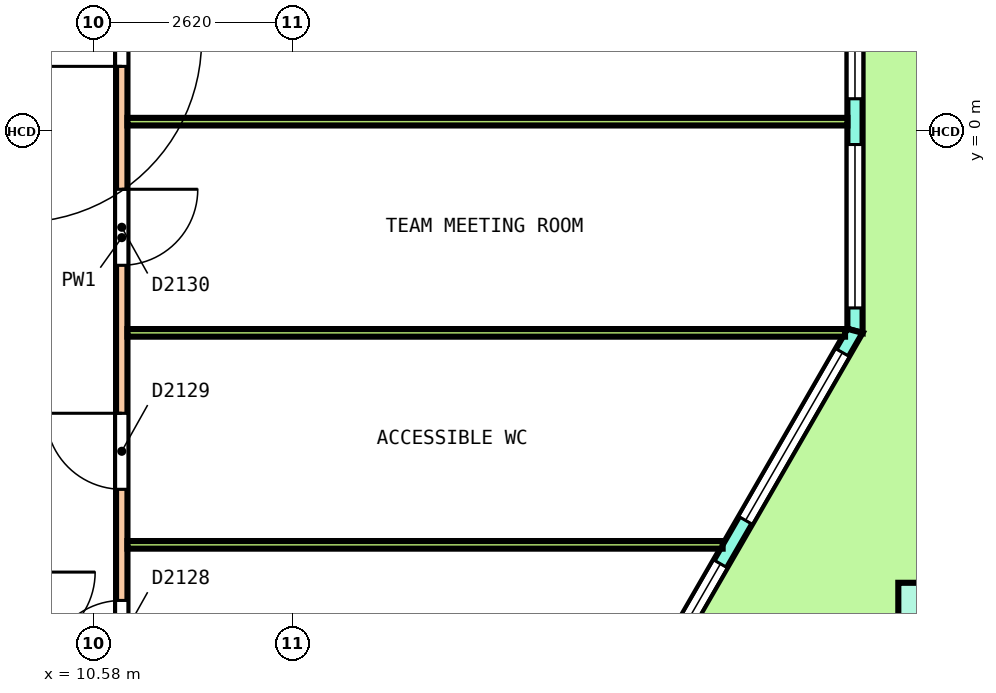
"""IFC4 building model, lengths in metres.
Left out: names, types, materials, properties, quantities, classifications, styles, units other than length and angle.
Written with IfcOpenShell. Run it as: python <this file> out.ifc"""

import sys

from ifc_helpers import new_model, si_unit, direction, frame, frame_2d, origin, origin_2d, place, context, subcontext, project, spatial, polyline, rectangle, outline, extrude, element, fill, save


model = new_model("IFC4")
c1 = context("Model", 3, precision=1e-05, world=origin(), true_north=direction((0.0, 1.0)))
c2 = subcontext(c1, "Body", "Model", "MODEL_VIEW")
j1 = project(units=[si_unit("LENGTHUNIT", "METRE"), si_unit("PLANEANGLEUNIT", "RADIAN")], contexts=[c1])
p1 = place(None, origin())
s1 = spatial("IfcSite", under=j1, at=p1, CompositionType="ELEMENT")
p2 = place(p1, origin())
s2 = spatial("IfcBuilding", under=s1, at=p2, CompositionType="ELEMENT")
p3 = place(p2, frame((0.0, 0.0, 267.0)))
s3 = spatial("IfcBuildingStorey", under=s2, at=p3, CompositionType="ELEMENT", Elevation=267.0)
p4 = place(p3, frame((21.642, -6.416, 0.0), z_axis=(0.010900423214, 0.018858400897, 0.999762742599), x_axis=(0.500226175498, 0.86562076849, -0.02178206845)))
e1 = element("IfcColumn", 1, at=p4, inside=s3, PredefinedType="COLUMN", context=c2, shape_type="SweptSolid", body=[
    extrude(rectangle(XDim=0.95, YDim=0.95, at=origin_2d()), origin(), (0.0, 0.0, 1.0), 3.651),
])
p5 = place(p3, frame((20.596, -2.626, 0.0), z_axis=(0.0, 0.0, 1.0), x_axis=(0.0, 1.0, 0.0)))
e2 = element("IfcWall", 2, at=p5, inside=s3, PredefinedType="SOLIDWALL", context=c2, shape_type="SweptSolid", body=[
    extrude(outline(polyline([(-0.027, -0.1), (1.084, -0.1), (2.196, -0.1), (3.307, -0.1), (4.419, -0.1), (5.53, -0.1), (5.477, 0.1), (4.387, 0.1), (3.297, 0.1), (2.207, 0.1), (1.117, 0.1), (0.027, 0.1), (-0.027, -0.1)])), origin(), (0.0, 0.0, 1.0), 3.7),
])
p6 = place(p5, frame((0.301, 0.0, 0.1)))
e3 = element("IfcOpeningElement", 3, at=p6, cuts=e2, PredefinedType="OPENING", context=c2, shape_type="SweptSolid", body=[
    extrude(rectangle(XDim=2.15, YDim=2.75, at=frame_2d((1.075, 1.375))), frame((0.0, 0.11, 0.0), z_axis=(0.0, -1.0, 0.0), x_axis=(1.0, 0.0, 0.0)), (0.0, 0.0, 1.0), 0.22),
])
p7 = place(p5, frame((3.052, 0.0, 0.1)))
e4 = element("IfcOpeningElement", 4, at=p7, cuts=e2, PredefinedType="OPENING", context=c2, shape_type="SweptSolid", body=[
    extrude(rectangle(XDim=2.15, YDim=2.75, at=frame_2d((1.075, 1.375))), frame((0.0, 0.11, 0.0), z_axis=(0.0, -1.0, 0.0), x_axis=(1.0, 0.0, 0.0)), (0.0, 0.0, 1.0), 0.22),
])
p8 = place(p3, frame((12.573, -16.524, 0.0), z_axis=(0.0, 0.0, 1.0), x_axis=(0.499997245374, 0.866026994163, 0.0)))
e5 = element("IfcWall", 5, at=p8, inside=s3, PredefinedType="SOLIDWALL", context=c2, shape_type="SweptSolid", body=[
    extrude(outline(polyline([(-0.027, -0.1), (0.979, -0.1), (1.986, -0.1), (2.992, -0.1), (3.999, -0.1), (5.005, -0.1), (6.011, -0.1), (7.018, -0.1), (8.024, -0.1), (9.03, -0.1), (10.037, -0.1), (11.043, -0.1), (12.049, -0.1), (13.056, -0.1), (14.062, -0.1), (15.068, -0.1), (16.075, -0.1), (16.021, 0.1), (15.021, 0.1), (14.022, 0.1), (13.022, 0.1), (12.022, 0.1), (11.023, 0.1), (10.023, 0.1), (9.023, 0.1), (8.024, 0.1), (7.024, 0.1), (6.025, 0.1), (5.025, 0.1), (4.025, 0.1), (3.026, 0.1), (2.026, 0.1), (1.026, 0.1), (0.027, 0.1), (-0.027, -0.1)])), origin(), (0.0, 0.0, 1.0), 3.7),
])
p9 = place(p8, frame((0.33, 0.0, 0.1)))
e6 = element("IfcOpeningElement", 6, at=p9, cuts=e5, PredefinedType="OPENING", context=c2, shape_type="SweptSolid", body=[
    extrude(rectangle(XDim=2.55, YDim=2.75, at=frame_2d((1.275, 1.375))), frame((0.0, 0.11, 0.0), z_axis=(0.0, -1.0, 0.0), x_axis=(1.0, 0.0, 0.0)), (0.0, 0.0, 1.0), 0.22),
])
p10 = place(p8, frame((3.539, 0.0, 0.1)))
e7 = element("IfcOpeningElement", 7, at=p10, cuts=e5, PredefinedType="OPENING", context=c2, shape_type="SweptSolid", body=[
    extrude(rectangle(XDim=2.55, YDim=2.75, at=frame_2d((1.275, 1.375))), frame((0.0, 0.11, 0.0), z_axis=(0.0, -1.0, 0.0), x_axis=(1.0, 0.0, 0.0)), (0.0, 0.0, 1.0), 0.22),
])
p11 = place(p8, frame((7.124, 0.0, 0.0)))
e8 = element("IfcOpeningElement", 8, at=p11, cuts=e5, PredefinedType="OPENING", context=c2, shape_type="SweptSolid", body=[
    extrude(rectangle(XDim=1.8, YDim=2.4, at=frame_2d((0.9, 1.2))), frame((0.0, 0.11, 0.0), z_axis=(0.0, -1.0, 0.0), x_axis=(1.0, 0.0, 0.0)), (0.0, 0.0, 1.0), 0.22),
])
p12 = place(p8, frame((7.124, 0.0, 2.55)))
e9 = element("IfcOpeningElement", 9, at=p12, cuts=e5, PredefinedType="OPENING", context=c2, shape_type="SweptSolid", body=[
    extrude(rectangle(XDim=1.8, YDim=0.3, at=frame_2d((0.9, 0.15))), frame((0.0, 0.11, 0.0), z_axis=(0.0, -1.0, 0.0), x_axis=(1.0, 0.0, 0.0)), (0.0, 0.0, 1.0), 0.22),
])
p13 = place(p8, frame((9.958, 0.0, 0.1)))
e10 = element("IfcOpeningElement", 10, at=p13, cuts=e5, PredefinedType="OPENING", context=c2, shape_type="SweptSolid", body=[
    extrude(rectangle(XDim=2.55, YDim=2.75, at=frame_2d((1.275, 1.375))), frame((0.0, 0.11, 0.0), z_axis=(0.0, -1.0, 0.0), x_axis=(1.0, 0.0, 0.0)), (0.0, 0.0, 1.0), 0.22),
])
p14 = place(p8, frame((13.168, 0.0, 0.1)))
e11 = element("IfcOpeningElement", 11, at=p14, cuts=e5, PredefinedType="OPENING", context=c2, shape_type="SweptSolid", body=[
    extrude(rectangle(XDim=2.55, YDim=2.75, at=frame_2d((1.275, 1.375))), frame((0.0, 0.11, 0.0), z_axis=(0.0, -1.0, 0.0), x_axis=(1.0, 0.0, 0.0)), (0.0, 0.0, 1.0), 0.22),
])
p15 = place(p3, frame((10.95, -9.975, 0.0), z_axis=(0.0, 0.0, 1.0), x_axis=(0.0, 1.0, 0.0)))
e12 = element("IfcWall", 12, at=p15, inside=s3, PredefinedType="PARTITIONING", context=c2, shape_type="SweptSolid", body=[
    extrude(rectangle(XDim=17.15, YDim=0.15, at=frame_2d((8.575, 0.0))), origin(), (0.0, 0.0, 1.0), 2.9),
])
p16 = place(p15, frame((10.828, 0.0, 0.0)))
e13 = element("IfcOpeningElement", 13, at=p16, cuts=e12, PredefinedType="OPENING", context=c2, shape_type="SweptSolid", body=[
    extrude(rectangle(XDim=1.0, YDim=2.1, at=frame_2d((0.5, 1.05))), frame((0.0, 0.085, 0.0), z_axis=(0.0, -1.0, 0.0), x_axis=(1.0, 0.0, 0.0)), (0.0, 0.0, 1.0), 0.17),
])
p17 = place(p15, frame((13.989, 0.0, 0.0)))
e14 = element("IfcOpeningElement", 14, at=p17, cuts=e12, PredefinedType="OPENING", context=c2, shape_type="SweptSolid", body=[
    extrude(rectangle(XDim=1.0, YDim=2.1, at=frame_2d((0.5, 1.05))), frame((0.0, 0.085, 0.0), z_axis=(0.0, -1.0, 0.0), x_axis=(1.0, 0.0, 0.0)), (0.0, 0.0, 1.0), 0.17),
])
p18 = place(p15, frame((2.802, 0.0, 0.0)))
e15 = element("IfcOpeningElement", 15, at=p18, cuts=e12, PredefinedType="OPENING", context=c2, shape_type="SweptSolid", body=[
    extrude(rectangle(XDim=1.0, YDim=2.1, at=frame_2d((0.5, 1.05))), frame((0.0, 0.085, 0.0), z_axis=(0.0, -1.0, 0.0), x_axis=(1.0, 0.0, 0.0)), (0.0, 0.0, 1.0), 0.17),
])
p19 = place(p15, frame((5.264, 0.0, 0.0)))
e16 = element("IfcOpeningElement", 16, at=p19, cuts=e12, PredefinedType="OPENING", context=c2, shape_type="SweptSolid", body=[
    extrude(rectangle(XDim=1.0, YDim=2.1, at=frame_2d((0.5, 1.05))), frame((0.0, 0.085, 0.0), z_axis=(0.0, -1.0, 0.0), x_axis=(1.0, 0.0, 0.0)), (0.0, 0.0, 1.0), 0.17),
])
p20 = place(p15, frame((8.211, 0.0, 0.0)))
e17 = element("IfcOpeningElement", 17, at=p20, cuts=e12, PredefinedType="OPENING", context=c2, shape_type="SweptSolid", body=[
    extrude(rectangle(XDim=1.0, YDim=2.1, at=frame_2d((0.5, 1.05))), frame((0.0, 0.085, 0.0), z_axis=(0.0, -1.0, 0.0), x_axis=(1.0, 0.0, 0.0)), (0.0, 0.0, 1.0), 0.17),
])
p21 = place(p3, frame((11.025, 0.126, 0.0), z_axis=(0.0, 0.0, 1.0), x_axis=(1.0, 0.0, 0.0)))
e18 = element("IfcWall", 18, at=p21, inside=s3, PredefinedType="PARTITIONING", context=c2, shape_type="SweptSolid", body=[
    extrude(rectangle(XDim=9.471, YDim=0.1, at=frame_2d((4.736, 0.0))), origin(), (0.0, 0.0, 1.0), 2.9),
])
p22 = place(p3, frame((11.025, -2.653, 0.0), z_axis=(0.0, 0.0, 1.0), x_axis=(1.0, 0.0, 0.0)))
e19 = element("IfcWall", 19, at=p22, inside=s3, PredefinedType="PARTITIONING", context=c2, shape_type="SweptSolid", body=[
    extrude(rectangle(XDim=9.441, YDim=0.1, at=frame_2d((4.72, 0.0))), origin(), (0.0, 0.0, 1.0), 2.9),
])
p23 = place(p3, frame((11.025, -5.442, 0.0), z_axis=(0.0, 0.0, 1.0), x_axis=(1.0, 0.0, 0.0)))
e20 = element("IfcWall", 20, at=p23, inside=s3, PredefinedType="PARTITIONING", context=c2, shape_type="SweptSolid", body=[
    extrude(rectangle(XDim=7.83, YDim=0.1, at=frame_2d((3.915, 0.0))), origin(), (0.0, 0.0, 1.0), 2.9),
])
p24 = place(p6, origin())
e21 = element("IfcWindow", 21, at=p24, inside=s3, PartitioningType="SINGLE_PANEL", PredefinedType="WINDOW", context=c2, shape_type="SweptSolid", body=[
    extrude(rectangle(XDim=2.15, YDim=2.75, at=frame_2d((1.075, 1.375))), frame((0.0, 0.03, 0.0), z_axis=(0.0, -1.0, 0.0), x_axis=(1.0, 0.0, 0.0)), (0.0, 0.0, 1.0), 0.06),
])
fill(e3, e21)
p25 = place(p7, origin())
e22 = element("IfcWindow", 22, at=p25, inside=s3, PartitioningType="SINGLE_PANEL", PredefinedType="WINDOW", context=c2, shape_type="SweptSolid", body=[
    extrude(rectangle(XDim=2.15, YDim=2.75, at=frame_2d((1.075, 1.375))), frame((0.0, 0.03, 0.0), z_axis=(0.0, -1.0, 0.0), x_axis=(1.0, 0.0, 0.0)), (0.0, 0.0, 1.0), 0.06),
])
fill(e4, e22)
p26 = place(p13, origin())
e23 = element("IfcWindow", 23, at=p26, inside=s3, PartitioningType="SINGLE_PANEL", PredefinedType="WINDOW", context=c2, shape_type="SweptSolid", body=[
    extrude(rectangle(XDim=2.55, YDim=2.75, at=frame_2d((1.275, 1.375))), frame((0.0, 0.03, 0.0), z_axis=(0.0, -1.0, 0.0), x_axis=(1.0, 0.0, 0.0)), (0.0, 0.0, 1.0), 0.06),
])
fill(e10, e23)
p27 = place(p14, origin())
e24 = element("IfcWindow", 24, at=p27, inside=s3, PartitioningType="SINGLE_PANEL", PredefinedType="WINDOW", context=c2, shape_type="SweptSolid", body=[
    extrude(rectangle(XDim=2.55, YDim=2.75, at=frame_2d((1.275, 1.375))), frame((0.0, 0.03, 0.0), z_axis=(0.0, -1.0, 0.0), x_axis=(1.0, 0.0, 0.0)), (0.0, 0.0, 1.0), 0.06),
])
fill(e11, e24)
p28 = place(p16, origin())
e25 = element("IfcDoor", 25, at=p28, inside=s3, OperationType="SINGLE_SWING_LEFT", PredefinedType="DOOR", context=c2, shape_type="SweptSolid", body=[
    extrude(rectangle(XDim=1.0, YDim=2.1, at=frame_2d((0.5, 1.05))), frame((0.0, 0.025, 0.0), z_axis=(0.0, -1.0, 0.0), x_axis=(1.0, 0.0, 0.0)), (0.0, 0.0, 1.0), 0.05),
])
fill(e13, e25)
p29 = place(p18, origin())
e26 = element("IfcDoor", 26, at=p29, inside=s3, OperationType="SINGLE_SWING_LEFT", PredefinedType="DOOR", context=c2, shape_type="SweptSolid", body=[
    extrude(rectangle(XDim=1.0, YDim=2.1, at=frame_2d((0.5, 1.05))), frame((0.0, 0.025, 0.0), z_axis=(0.0, -1.0, 0.0), x_axis=(1.0, 0.0, 0.0)), (0.0, 0.0, 1.0), 0.05),
])
fill(e15, e26)
p30 = place(p19, origin())
e27 = element("IfcDoor", 27, at=p30, inside=s3, OperationType="SINGLE_SWING_RIGHT", PredefinedType="DOOR", context=c2, shape_type="SweptSolid", body=[
    extrude(rectangle(XDim=1.0, YDim=2.1, at=frame_2d((0.5, 1.05))), frame((0.0, 0.025, 0.0), z_axis=(0.0, -1.0, 0.0), x_axis=(1.0, 0.0, 0.0)), (0.0, 0.0, 1.0), 0.05),
])
fill(e16, e27)
p31 = place(p20, origin())
e28 = element("IfcDoor", 28, at=p31, inside=s3, OperationType="SINGLE_SWING_LEFT", PredefinedType="DOOR", context=c2, shape_type="SweptSolid", body=[
    extrude(rectangle(XDim=1.0, YDim=2.1, at=frame_2d((0.5, 1.05))), frame((0.0, 0.025, 0.0), z_axis=(0.0, -1.0, 0.0), x_axis=(1.0, 0.0, 0.0)), (0.0, 0.0, 1.0), 0.05),
])
fill(e17, e28)
save(model, sys.argv[1])
